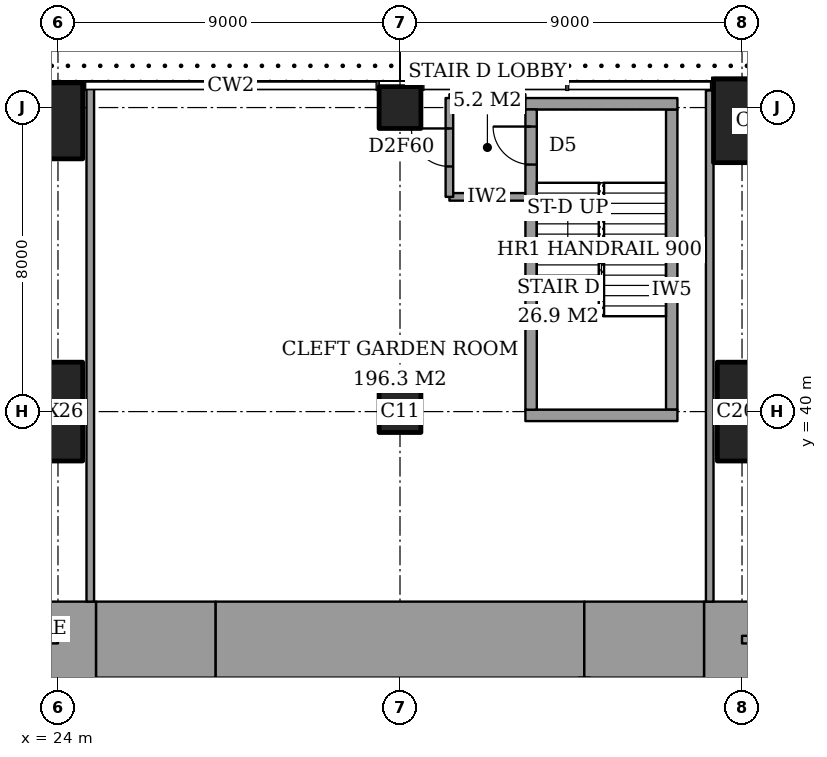
"""IFC4 building model, lengths in metres.
Left out: names, types, materials, properties, quantities, classifications, styles, units other than length and angle.
Written with IfcOpenShell. Run it as: python <this file> out.ifc"""

import sys

from ifc_helpers import new_model, si_unit, direction, frame, frame_2d, origin, origin_2d, place, context, subcontext, project, spatial, rectangle, extrude, element, fill, save


model = new_model("IFC4")
c1 = context("Model", 3, precision=1e-05, world=origin(), true_north=direction((0.0, 1.0)))
c2 = subcontext(c1, "Body", "Model", "MODEL_VIEW")
j1 = project(units=[si_unit("LENGTHUNIT", "METRE"), si_unit("PLANEANGLEUNIT", "RADIAN")], contexts=[c1])
p1 = place(None, origin())
s1 = spatial("IfcSite", under=j1, at=p1, CompositionType="ELEMENT")
p2 = place(p1, origin())
s2 = spatial("IfcBuilding", under=s1, at=p2, CompositionType="ELEMENT")
p3 = place(p2, frame((0.0, 0.0, 16.0)))
s3 = spatial("IfcBuildingStorey", under=s2, at=p3, CompositionType="ELEMENT", Elevation=16.0)
p4 = place(p3, frame((23.65, 40.0, 0.0), z_axis=(0.0, 0.0, 1.0), x_axis=(1.0, 0.0, 0.0)))
e1 = element("IfcColumn", 1, at=p4, inside=s3, PredefinedType="COLUMN", context=c2, shape_type="SweptSolid", body=[
    extrude(rectangle(XDim=2.0, YDim=2.6, at=origin_2d()), origin(), (0.0, 0.0, 1.0), 5.0),
])
p5 = place(p3, frame((23.65, 47.65, 0.0), z_axis=(0.0, 0.0, 1.0), x_axis=(1.0, 0.0, 0.0)))
e2 = element("IfcColumn", 2, at=p5, inside=s3, PredefinedType="COLUMN", context=c2, shape_type="SweptSolid", body=[
    extrude(rectangle(XDim=2.0, YDim=2.0, at=origin_2d()), origin(), (0.0, 0.0, 1.0), 5.0),
])
for number, where, z_axis, x_axis in (
    (3, (33.0, 40.0, 0.0), (0.0, 0.0, 1.0), (1.0, 0.0, 0.0)),
    (4, (33.0, 48.0, 0.0), (0.0, 0.0, 1.0), (1.0, 0.0, 0.0)),
):
    element("IfcColumn", number, at=place(p3, frame(where, z_axis=z_axis, x_axis=x_axis)), inside=s3, PredefinedType="COLUMN", context=c2, shape_type="SweptSolid", body=[
        extrude(rectangle(XDim=1.1, YDim=1.1, at=origin_2d()), origin(), (0.0, 0.0, 1.0), 5.0),
    ])
p6 = place(p3, frame((42.35, 40.0, 0.0), z_axis=(0.0, 0.0, 1.0), x_axis=(1.0, 0.0, 0.0)))
e5 = element("IfcColumn", 5, at=p6, inside=s3, PredefinedType="COLUMN", context=c2, shape_type="SweptSolid", body=[
    extrude(rectangle(XDim=2.0, YDim=2.6, at=origin_2d()), origin(), (0.0, 0.0, 1.0), 5.0),
])
p7 = place(p3, frame((42.35, 47.65, 0.0), z_axis=(0.0, 0.0, 1.0), x_axis=(1.0, 0.0, 0.0)))
e6 = element("IfcColumn", 6, at=p7, inside=s3, PredefinedType="COLUMN", context=c2, shape_type="SweptSolid", body=[
    extrude(rectangle(XDim=2.2, YDim=2.2, at=origin_2d()), origin(), (0.0, 0.0, 1.0), 5.0),
])
p8 = place(p3, frame((25.0, 34.0, 0.0), z_axis=(0.0, 0.0, 1.0), x_axis=(1.0, 0.0, 0.0)))
e7 = element("IfcWall", 7, at=p8, inside=s3, PredefinedType="SHEAR", context=c2, shape_type="SweptSolid", body=[
    extrude(rectangle(XDim=3.15, YDim=2.0, at=frame_2d((1.575, 0.0))), origin(), (0.0, 0.0, 1.0), 5.0),
])
p9 = place(p3, frame((28.15, 34.0, 0.0), z_axis=(0.0, 0.0, 1.0), x_axis=(1.0, 0.0, 0.0)))
e8 = element("IfcWall", 8, at=p9, inside=s3, PredefinedType="SHEAR", context=c2, shape_type="SweptSolid", body=[
    extrude(rectangle(XDim=9.7, YDim=2.0, at=frame_2d((4.85, 0.0))), origin(), (0.0, 0.0, 1.0), 5.0),
])
p10 = place(p3, frame((37.85, 34.0, 0.0), z_axis=(0.0, 0.0, 1.0), x_axis=(1.0, 0.0, 0.0)))
e9 = element("IfcWall", 9, at=p10, inside=s3, PredefinedType="SHEAR", context=c2, shape_type="SweptSolid", body=[
    extrude(rectangle(XDim=3.15, YDim=2.0, at=frame_2d((1.575, 0.0))), origin(), (0.0, 0.0, 1.0), 5.0),
])
p11 = place(p3, frame((24.3, 23.15, 0.0), z_axis=(0.0, 0.0, 1.0), x_axis=(0.0, 1.0, 0.0)))
e10 = element("IfcWall", 10, at=p11, inside=s3, PredefinedType="SHEAR", context=c2, shape_type="SweptSolid", body=[
    extrude(rectangle(XDim=11.85, YDim=1.4, at=frame_2d((5.925, 0.0))), origin(), (0.0, 0.0, 1.0), 5.0),
])
p12 = place(p11, frame((0.75, 0.0, 0.0)))
e11 = element("IfcOpeningElement", 11, at=p12, cuts=e10, PredefinedType="OPENING", context=c2, shape_type="SweptSolid", body=[
    extrude(rectangle(XDim=1.8, YDim=2.4, at=frame_2d((0.9, 1.2))), frame((0.0, 0.71, 0.0), z_axis=(0.0, -1.0, 0.0), x_axis=(1.0, 0.0, 0.0)), (0.0, 0.0, 1.0), 1.42),
])
p13 = place(p3, frame((41.7, 24.85, 0.0), z_axis=(0.0, 0.0, 1.0), x_axis=(0.0, 1.0, 0.0)))
e12 = element("IfcWall", 12, at=p13, inside=s3, PredefinedType="SHEAR", context=c2, shape_type="SweptSolid", body=[
    extrude(rectangle(XDim=10.15, YDim=1.4, at=frame_2d((5.075, 0.0))), origin(), (0.0, 0.0, 1.0), 5.0),
])
p14 = place(p3, frame((22.45, 34.0, 0.0), z_axis=(0.0, 0.0, 1.0), x_axis=(1.0, 0.0, 0.0)))
e13 = element("IfcWall", 13, at=p14, inside=s3, PredefinedType="PARTITIONING", context=c2, shape_type="SweptSolid", body=[
    extrude(rectangle(XDim=1.55, YDim=0.2, at=frame_2d((0.775, 0.0))), origin(), (0.0, 0.0, 1.0), 4.7),
])
p15 = place(p3, frame((42.0, 34.0, 0.0), z_axis=(0.0, 0.0, 1.0), x_axis=(1.0, 0.0, 0.0)))
e14 = element("IfcWall", 14, at=p15, inside=s3, PredefinedType="PARTITIONING", context=c2, shape_type="SweptSolid", body=[
    extrude(rectangle(XDim=6.0, YDim=0.2, at=frame_2d((3.0, 0.0))), origin(), (0.0, 0.0, 1.0), 4.7),
])
for number, where, z_axis, x_axis in (
    (15, (34.3, 45.65, 0.0), (0.0, 0.0, 1.0), (1.0, 0.0, 0.0)),
    (16, (34.3, 48.25, 0.0), (0.0, 0.0, 1.0), (1.0, 0.0, 0.0)),
):
    element("IfcWall", number, at=place(p3, frame(where, z_axis=z_axis, x_axis=x_axis)), inside=s3, PredefinedType="PARTITIONING", context=c2, shape_type="SweptSolid", body=[
        extrude(rectangle(XDim=2.0, YDim=0.2, at=frame_2d((1.0, 0.0))), origin(), (0.0, 0.0, 1.0), 4.7),
    ])
p16 = place(p3, frame((24.85, 35.0, 0.0), z_axis=(0.0, 0.0, 1.0), x_axis=(0.0, 1.0, 0.0)))
e17 = element("IfcWall", 17, at=p16, inside=s3, PredefinedType="PARTITIONING", context=c2, shape_type="SweptSolid", body=[
    extrude(rectangle(XDim=13.561, YDim=0.2, at=frame_2d((6.781, 0.0))), origin(), (0.0, 0.0, 1.0), 4.7),
])
p17 = place(p3, frame((34.3, 45.65, 0.0), z_axis=(0.0, 0.0, 1.0), x_axis=(0.0, 1.0, 0.0)))
e18 = element("IfcWall", 18, at=p17, inside=s3, PredefinedType="PARTITIONING", context=c2, shape_type="SweptSolid", body=[
    extrude(rectangle(XDim=2.6, YDim=0.2, at=frame_2d((1.3, 0.0))), origin(), (0.0, 0.0, 1.0), 4.7),
])
p18 = place(p17, frame((0.8, 0.0, 0.0)))
e19 = element("IfcOpeningElement", 19, at=p18, cuts=e18, PredefinedType="OPENING", context=c2, shape_type="SweptSolid", body=[
    extrude(rectangle(XDim=1.0, YDim=2.1, at=frame_2d((0.5, 1.05))), frame((0.0, 0.11, 0.0), z_axis=(0.0, -1.0, 0.0), x_axis=(1.0, 0.0, 0.0)), (0.0, 0.0, 1.0), 0.22),
])
p19 = place(p3, frame((41.15, 35.0, 0.0), z_axis=(0.0, 0.0, 1.0), x_axis=(0.0, 1.0, 0.0)))
e20 = element("IfcWall", 20, at=p19, inside=s3, PredefinedType="PARTITIONING", context=c2, shape_type="SweptSolid", body=[
    extrude(rectangle(XDim=13.45, YDim=0.2, at=frame_2d((6.725, 0.0))), origin(), (0.0, 0.0, 1.0), 4.7),
])
for number, where, z_axis, x_axis in (
    (21, (36.3, 39.9, 0.0), (0.0, 0.0, 1.0), (1.0, 0.0, 0.0)),
    (22, (36.3, 48.1, 0.0), (0.0, 0.0, 1.0), (1.0, 0.0, 0.0)),
):
    element("IfcWall", number, at=place(p3, frame(where, z_axis=z_axis, x_axis=x_axis)), inside=s3, PredefinedType="PARTITIONING", context=c2, shape_type="SweptSolid", body=[
        extrude(rectangle(XDim=4.0, YDim=0.3, at=frame_2d((2.0, 0.0))), origin(), (0.0, 0.0, 1.0), 5.0),
    ])
p20 = place(p3, frame((36.45, 40.05, 0.0), z_axis=(0.0, 0.0, 1.0), x_axis=(0.0, 1.0, 0.0)))
e23 = element("IfcWall", 23, at=p20, inside=s3, PredefinedType="PARTITIONING", context=c2, shape_type="SweptSolid", body=[
    extrude(rectangle(XDim=7.9, YDim=0.3, at=frame_2d((3.95, 0.0))), origin(), (0.0, 0.0, 1.0), 5.0),
])
p21 = place(p20, frame((6.45, 0.0, 0.0)))
e24 = element("IfcOpeningElement", 24, at=p21, cuts=e23, PredefinedType="OPENING", context=c2, shape_type="SweptSolid", body=[
    extrude(rectangle(XDim=1.0, YDim=2.1, at=frame_2d((0.5, 1.05))), frame((0.0, 0.16, 0.0), z_axis=(0.0, -1.0, 0.0), x_axis=(1.0, 0.0, 0.0)), (0.0, 0.0, 1.0), 0.32),
])
p22 = place(p3, frame((40.15, 40.05, 0.0), z_axis=(0.0, 0.0, 1.0), x_axis=(0.0, 1.0, 0.0)))
e25 = element("IfcWall", 25, at=p22, inside=s3, PredefinedType="PARTITIONING", context=c2, shape_type="SweptSolid", body=[
    extrude(rectangle(XDim=7.9, YDim=0.3, at=frame_2d((3.95, 0.0))), origin(), (0.0, 0.0, 1.0), 5.0),
])
p23 = place(p18, origin())
e26 = element("IfcDoor", 26, at=p23, inside=s3, OperationType="SINGLE_SWING_LEFT", PredefinedType="DOOR", context=c2, shape_type="SweptSolid", body=[
    extrude(rectangle(XDim=1.0, YDim=2.1, at=frame_2d((0.5, 1.05))), frame((0.0, 0.025, 0.0), z_axis=(0.0, -1.0, 0.0), x_axis=(1.0, 0.0, 0.0)), (0.0, 0.0, 1.0), 0.05),
])
fill(e19, e26)
p24 = place(p21, origin())
e27 = element("IfcDoor", 27, at=p24, inside=s3, OperationType="SINGLE_SWING_LEFT", PredefinedType="DOOR", context=c2, shape_type="SweptSolid", body=[
    extrude(rectangle(XDim=1.0, YDim=2.1, at=frame_2d((0.5, 1.05))), frame((0.0, 0.025, 0.0), z_axis=(0.0, -1.0, 0.0), x_axis=(1.0, 0.0, 0.0)), (0.0, 0.0, 1.0), 0.05),
])
fill(e24, e27)
save(model, sys.argv[1])
